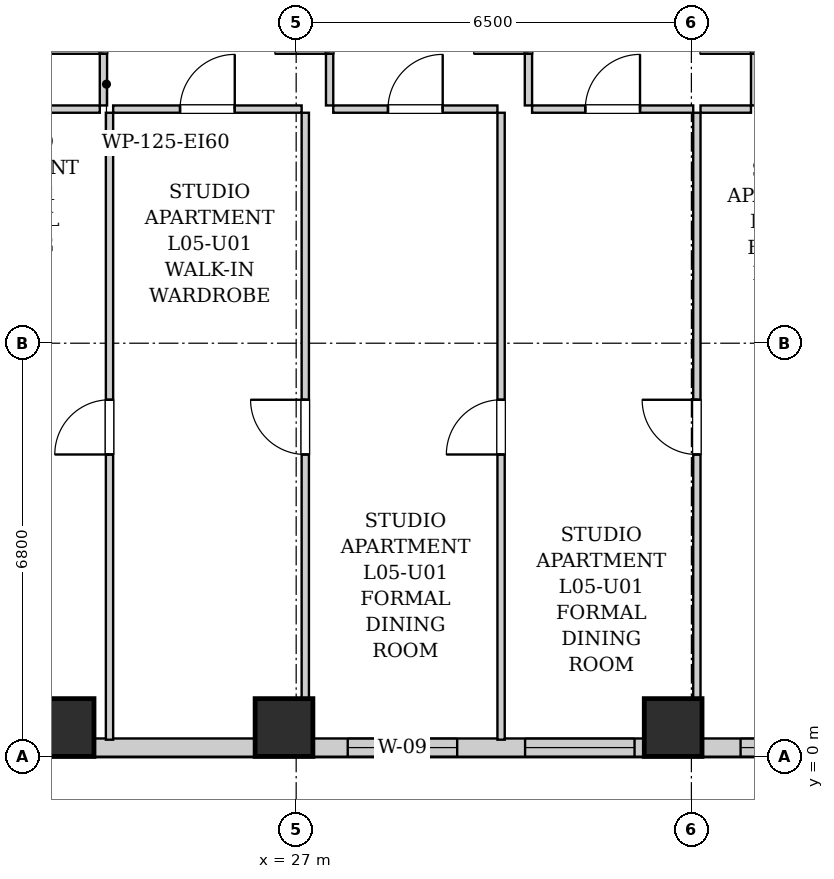
"""IFC4 building model, lengths in metres.
Left out: names, types, materials, properties, quantities, classifications, styles, units other than length and angle.
Written with IfcOpenShell. Run it as: python <this file> out.ifc"""

import sys

from ifc_helpers import new_model, si_unit, direction, frame, frame_2d, origin, origin_2d, place, context, subcontext, project, spatial, rectangle, extrude, element, fill, save


model = new_model("IFC4")
c1 = context("Model", 3, precision=1e-05, world=origin(), true_north=direction((0.0, 1.0)))
c2 = subcontext(c1, "Body", "Model", "MODEL_VIEW")
j1 = project(units=[si_unit("LENGTHUNIT", "METRE"), si_unit("PLANEANGLEUNIT", "RADIAN")], contexts=[c1])
p1 = place(None, origin())
s1 = spatial("IfcSite", under=j1, at=p1, CompositionType="ELEMENT")
p2 = place(p1, origin())
s2 = spatial("IfcBuilding", under=s1, at=p2, CompositionType="ELEMENT")
p3 = place(p2, frame((0.0, 0.0, 25.8)))
s3 = spatial("IfcBuildingStorey", under=s2, at=p3, CompositionType="ELEMENT", Elevation=25.8)
for number, where, z_axis, x_axis in (
    (1, (23.2, 0.48, 0.0), (0.0, 0.0, 1.0), (1.0, 0.0, 0.0)),
    (2, (26.8, 0.48, 0.0), (0.0, 0.0, 1.0), (1.0, 0.0, 0.0)),
    (3, (33.2, 0.48, 0.0), (0.0, 0.0, 1.0), (1.0, 0.0, 0.0)),
):
    element("IfcColumn", number, at=place(p3, frame(where, z_axis=z_axis, x_axis=x_axis)), inside=s3, PredefinedType="COLUMN", context=c2, shape_type="SweptSolid", body=[
        extrude(rectangle(XDim=0.95, YDim=0.95, at=origin_2d()), origin(), (0.0, 0.0, 1.0), 3.2),
    ])
p4 = place(p3, frame((44.0, 0.15, 0.0), z_axis=(0.0, 0.0, 1.0), x_axis=(-1.0, 0.0, 0.0)))
e4 = element("IfcWall", 4, at=p4, inside=s3, PredefinedType="SOLIDWALL", context=c2, shape_type="SweptSolid", body=[
    extrude(rectangle(XDim=28.1, YDim=0.3, at=frame_2d((14.05, 0.0))), origin(), (0.0, 0.0, 1.0), 1.975),
])
p5 = place(p4, frame((26.835, 0.0, 0.55)))
e5 = element("IfcOpeningElement", 5, at=p5, cuts=e4, PredefinedType="OPENING", context=c2, shape_type="SweptSolid", body=[
    extrude(rectangle(XDim=0.85, YDim=1.2, at=frame_2d((0.425, 0.6))), frame((0.0, 0.16, 0.0), z_axis=(0.0, -1.0, 0.0), x_axis=(1.0, 0.0, 0.0)), (0.0, 0.0, 1.0), 0.32),
])
p6 = place(p4, frame((23.765, 0.0, 0.55)))
e6 = element("IfcOpeningElement", 6, at=p6, cuts=e4, PredefinedType="OPENING", context=c2, shape_type="SweptSolid", body=[
    extrude(rectangle(XDim=1.8, YDim=1.2, at=frame_2d((0.9, 0.6))), frame((0.0, 0.16, 0.0), z_axis=(0.0, -1.0, 0.0), x_axis=(1.0, 0.0, 0.0)), (0.0, 0.0, 1.0), 0.32),
])
p7 = place(p4, frame((21.5, 0.0, 0.55)))
e7 = element("IfcOpeningElement", 7, at=p7, cuts=e4, PredefinedType="OPENING", context=c2, shape_type="SweptSolid", body=[
    extrude(rectangle(XDim=1.35, YDim=1.2, at=frame_2d((0.675, 0.6))), frame((0.0, 0.16, 0.0), z_axis=(0.0, -1.0, 0.0), x_axis=(1.0, 0.0, 0.0)), (0.0, 0.0, 1.0), 0.32),
])
p8 = place(p4, frame((14.352, 0.0, 0.55)))
e8 = element("IfcOpeningElement", 8, at=p8, cuts=e4, PredefinedType="OPENING", context=c2, shape_type="SweptSolid", body=[
    extrude(rectangle(XDim=1.8, YDim=1.2, at=frame_2d((0.9, 0.6))), frame((0.0, 0.16, 0.0), z_axis=(0.0, -1.0, 0.0), x_axis=(1.0, 0.0, 0.0)), (0.0, 0.0, 1.0), 0.32),
])
p9 = place(p4, frame((11.435, 0.0, 0.55)))
e9 = element("IfcOpeningElement", 9, at=p9, cuts=e4, PredefinedType="OPENING", context=c2, shape_type="SweptSolid", body=[
    extrude(rectangle(XDim=1.8, YDim=1.2, at=frame_2d((0.9, 0.6))), frame((0.0, 0.16, 0.0), z_axis=(0.0, -1.0, 0.0), x_axis=(1.0, 0.0, 0.0)), (0.0, 0.0, 1.0), 0.32),
])
p10 = place(p4, frame((7.891, 0.0, 0.55)))
e10 = element("IfcOpeningElement", 10, at=p10, cuts=e4, PredefinedType="OPENING", context=c2, shape_type="SweptSolid", body=[
    extrude(rectangle(XDim=1.8, YDim=1.2, at=frame_2d((0.9, 0.6))), frame((0.0, 0.16, 0.0), z_axis=(0.0, -1.0, 0.0), x_axis=(1.0, 0.0, 0.0)), (0.0, 0.0, 1.0), 0.32),
])
p11 = place(p4, frame((4.315, 0.0, 0.55)))
e11 = element("IfcOpeningElement", 11, at=p11, cuts=e4, PredefinedType="OPENING", context=c2, shape_type="SweptSolid", body=[
    extrude(rectangle(XDim=0.85, YDim=1.2, at=frame_2d((0.425, 0.6))), frame((0.0, 0.16, 0.0), z_axis=(0.0, -1.0, 0.0), x_axis=(1.0, 0.0, 0.0)), (0.0, 0.0, 1.0), 0.32),
])
p12 = place(p3, frame((23.83, 10.71, 0.0), z_axis=(0.0, 0.0, 1.0), x_axis=(0.0, 1.0, 0.0)))
e12 = element("IfcWall", 12, at=p12, inside=s3, PredefinedType="PARTITIONING", context=c2, shape_type="SweptSolid", body=[
    extrude(rectangle(XDim=2.6, YDim=0.12, at=frame_2d((1.3, 0.0))), origin(), (0.0, 0.0, 1.0), 2.94),
])
p13 = place(p12, frame((0.85, 0.0, 0.0)))
e13 = element("IfcOpeningElement", 13, at=p13, cuts=e12, PredefinedType="OPENING", context=c2, shape_type="SweptSolid", body=[
    extrude(rectangle(XDim=0.9, YDim=2.05, at=frame_2d((0.45, 1.025))), frame((0.0, 0.07, 0.0), z_axis=(0.0, -1.0, 0.0), x_axis=(1.0, 0.0, 0.0)), (0.0, 0.0, 1.0), 0.14),
])
p14 = place(p3, frame((20.77, 10.65, 0.0), z_axis=(0.0, 0.0, 1.0), x_axis=(1.0, 0.0, 0.0)))
e14 = element("IfcWall", 14, at=p14, inside=s3, PredefinedType="PARTITIONING", context=c2, shape_type="SweptSolid", body=[
    extrude(rectangle(XDim=3.0, YDim=0.12, at=frame_2d((1.5, 0.0))), origin(), (0.0, 0.0, 1.0), 2.94),
])
p15 = place(p14, frame((1.05, 0.0, 0.0)))
e15 = element("IfcOpeningElement", 15, at=p15, cuts=e14, PredefinedType="OPENING", context=c2, shape_type="SweptSolid", body=[
    extrude(rectangle(XDim=0.9, YDim=2.05, at=frame_2d((0.45, 1.025))), frame((0.0, 0.07, 0.0), z_axis=(0.0, -1.0, 0.0), x_axis=(1.0, 0.0, 0.0)), (0.0, 0.0, 1.0), 0.14),
])
p16 = place(p3, frame((27.55, 10.71, 0.0), z_axis=(0.0, 0.0, 1.0), x_axis=(0.0, 1.0, 0.0)))
e16 = element("IfcWall", 16, at=p16, inside=s3, PredefinedType="PARTITIONING", context=c2, shape_type="SweptSolid", body=[
    extrude(rectangle(XDim=2.6, YDim=0.12, at=frame_2d((1.3, 0.0))), origin(), (0.0, 0.0, 1.0), 2.94),
])
p17 = place(p16, frame((0.85, 0.0, 0.0)))
e17 = element("IfcOpeningElement", 17, at=p17, cuts=e16, PredefinedType="OPENING", context=c2, shape_type="SweptSolid", body=[
    extrude(rectangle(XDim=0.9, YDim=2.05, at=frame_2d((0.45, 1.025))), frame((0.0, 0.07, 0.0), z_axis=(0.0, -1.0, 0.0), x_axis=(1.0, 0.0, 0.0)), (0.0, 0.0, 1.0), 0.14),
])
p18 = place(p3, frame((23.99, 10.65, 0.0), z_axis=(0.0, 0.0, 1.0), x_axis=(1.0, 0.0, 0.0)))
e18 = element("IfcWall", 18, at=p18, inside=s3, PredefinedType="PARTITIONING", context=c2, shape_type="SweptSolid", body=[
    extrude(rectangle(XDim=3.1, YDim=0.12, at=frame_2d((1.55, 0.0))), origin(), (0.0, 0.0, 1.0), 2.94),
])
p19 = place(p18, frame((1.1, 0.0, 0.0)))
e19 = element("IfcOpeningElement", 19, at=p19, cuts=e18, PredefinedType="OPENING", context=c2, shape_type="SweptSolid", body=[
    extrude(rectangle(XDim=0.9, YDim=2.05, at=frame_2d((0.45, 1.025))), frame((0.0, 0.07, 0.0), z_axis=(0.0, -1.0, 0.0), x_axis=(1.0, 0.0, 0.0)), (0.0, 0.0, 1.0), 0.14),
])
p20 = place(p3, frame((30.82, 10.71, 0.0), z_axis=(0.0, 0.0, 1.0), x_axis=(0.0, 1.0, 0.0)))
e20 = element("IfcWall", 20, at=p20, inside=s3, PredefinedType="PARTITIONING", context=c2, shape_type="SweptSolid", body=[
    extrude(rectangle(XDim=2.6, YDim=0.12, at=frame_2d((1.3, 0.0))), origin(), (0.0, 0.0, 1.0), 2.94),
])
p21 = place(p20, frame((0.85, 0.0, 0.0)))
e21 = element("IfcOpeningElement", 21, at=p21, cuts=e20, PredefinedType="OPENING", context=c2, shape_type="SweptSolid", body=[
    extrude(rectangle(XDim=0.9, YDim=2.05, at=frame_2d((0.45, 1.025))), frame((0.0, 0.07, 0.0), z_axis=(0.0, -1.0, 0.0), x_axis=(1.0, 0.0, 0.0)), (0.0, 0.0, 1.0), 0.14),
])
p22 = place(p3, frame((27.61, 10.65, 0.0), z_axis=(0.0, 0.0, 1.0), x_axis=(1.0, 0.0, 0.0)))
e22 = element("IfcWall", 22, at=p22, inside=s3, PredefinedType="PARTITIONING", context=c2, shape_type="SweptSolid", body=[
    extrude(rectangle(XDim=2.7, YDim=0.12, at=frame_2d((1.35, 0.0))), origin(), (0.0, 0.0, 1.0), 2.94),
])
p23 = place(p22, frame((0.9, 0.0, 0.0)))
e23 = element("IfcOpeningElement", 23, at=p23, cuts=e22, PredefinedType="OPENING", context=c2, shape_type="SweptSolid", body=[
    extrude(rectangle(XDim=0.9, YDim=2.05, at=frame_2d((0.45, 1.025))), frame((0.0, 0.07, 0.0), z_axis=(0.0, -1.0, 0.0), x_axis=(1.0, 0.0, 0.0)), (0.0, 0.0, 1.0), 0.14),
])
p24 = place(p3, frame((34.54, 10.71, 0.0), z_axis=(0.0, 0.0, 1.0), x_axis=(0.0, 1.0, 0.0)))
e24 = element("IfcWall", 24, at=p24, inside=s3, PredefinedType="PARTITIONING", context=c2, shape_type="SweptSolid", body=[
    extrude(rectangle(XDim=2.6, YDim=0.12, at=frame_2d((1.3, 0.0))), origin(), (0.0, 0.0, 1.0), 2.94),
])
p25 = place(p24, frame((0.85, 0.0, 0.0)))
e25 = element("IfcOpeningElement", 25, at=p25, cuts=e24, PredefinedType="OPENING", context=c2, shape_type="SweptSolid", body=[
    extrude(rectangle(XDim=0.9, YDim=2.05, at=frame_2d((0.45, 1.025))), frame((0.0, 0.07, 0.0), z_axis=(0.0, -1.0, 0.0), x_axis=(1.0, 0.0, 0.0)), (0.0, 0.0, 1.0), 0.14),
])
p26 = place(p3, frame((30.88, 10.65, 0.0), z_axis=(0.0, 0.0, 1.0), x_axis=(1.0, 0.0, 0.0)))
e26 = element("IfcWall", 26, at=p26, inside=s3, PredefinedType="PARTITIONING", context=c2, shape_type="SweptSolid", body=[
    extrude(rectangle(XDim=2.65, YDim=0.12, at=frame_2d((1.325, 0.0))), origin(), (0.0, 0.0, 1.0), 2.94),
])
p27 = place(p26, frame((0.875, 0.0, 0.0)))
e27 = element("IfcOpeningElement", 27, at=p27, cuts=e26, PredefinedType="OPENING", context=c2, shape_type="SweptSolid", body=[
    extrude(rectangle(XDim=0.9, YDim=2.05, at=frame_2d((0.45, 1.025))), frame((0.0, 0.07, 0.0), z_axis=(0.0, -1.0, 0.0), x_axis=(1.0, 0.0, 0.0)), (0.0, 0.0, 1.0), 0.14),
])
p28 = place(p3, frame((33.65, 10.65, 0.0), z_axis=(0.0, 0.0, 1.0), x_axis=(1.0, 0.0, 0.0)))
e28 = element("IfcWall", 28, at=p28, inside=s3, PredefinedType="PARTITIONING", context=c2, shape_type="SweptSolid", body=[
    extrude(rectangle(XDim=0.83, YDim=0.12, at=frame_2d((0.415, 0.0))), origin(), (0.0, 0.0, 1.0), 2.94),
])
p29 = place(p3, frame((23.93, 0.28, 0.0), z_axis=(0.0, 0.0, 1.0), x_axis=(0.0, 1.0, 0.0)))
e29 = element("IfcWall", 29, at=p29, inside=s3, PredefinedType="PARTITIONING", context=c2, shape_type="SweptSolid", body=[
    extrude(rectangle(XDim=10.31, YDim=0.12, at=frame_2d((5.155, 0.0))), origin(), (0.0, 0.0, 1.0), 2.94),
])
p30 = place(p29, frame((4.69, 0.0, 0.0)))
e30 = element("IfcOpeningElement", 30, at=p30, cuts=e29, PredefinedType="OPENING", context=c2, shape_type="SweptSolid", body=[
    extrude(rectangle(XDim=0.9, YDim=2.05, at=frame_2d((0.45, 1.025))), frame((0.0, 0.07, 0.0), z_axis=(0.0, -1.0, 0.0), x_axis=(1.0, 0.0, 0.0)), (0.0, 0.0, 1.0), 0.14),
])
p31 = place(p3, frame((27.15, 0.28, 0.0), z_axis=(0.0, 0.0, 1.0), x_axis=(0.0, 1.0, 0.0)))
e31 = element("IfcWall", 31, at=p31, inside=s3, PredefinedType="PARTITIONING", context=c2, shape_type="SweptSolid", body=[
    extrude(rectangle(XDim=10.31, YDim=0.12, at=frame_2d((5.155, 0.0))), origin(), (0.0, 0.0, 1.0), 2.94),
])
p32 = place(p31, frame((4.69, 0.0, 0.0)))
e32 = element("IfcOpeningElement", 32, at=p32, cuts=e31, PredefinedType="OPENING", context=c2, shape_type="SweptSolid", body=[
    extrude(rectangle(XDim=0.9, YDim=2.05, at=frame_2d((0.45, 1.025))), frame((0.0, 0.07, 0.0), z_axis=(0.0, -1.0, 0.0), x_axis=(1.0, 0.0, 0.0)), (0.0, 0.0, 1.0), 0.14),
])
p33 = place(p3, frame((30.37, 0.28, 0.0), z_axis=(0.0, 0.0, 1.0), x_axis=(0.0, 1.0, 0.0)))
e33 = element("IfcWall", 33, at=p33, inside=s3, PredefinedType="PARTITIONING", context=c2, shape_type="SweptSolid", body=[
    extrude(rectangle(XDim=10.31, YDim=0.12, at=frame_2d((5.155, 0.0))), origin(), (0.0, 0.0, 1.0), 2.94),
])
p34 = place(p33, frame((4.69, 0.0, 0.0)))
e34 = element("IfcOpeningElement", 34, at=p34, cuts=e33, PredefinedType="OPENING", context=c2, shape_type="SweptSolid", body=[
    extrude(rectangle(XDim=0.9, YDim=2.05, at=frame_2d((0.45, 1.025))), frame((0.0, 0.07, 0.0), z_axis=(0.0, -1.0, 0.0), x_axis=(1.0, 0.0, 0.0)), (0.0, 0.0, 1.0), 0.14),
])
p35 = place(p3, frame((33.59, 0.28, 0.0), z_axis=(0.0, 0.0, 1.0), x_axis=(0.0, 1.0, 0.0)))
e35 = element("IfcWall", 35, at=p35, inside=s3, PredefinedType="PARTITIONING", context=c2, shape_type="SweptSolid", body=[
    extrude(rectangle(XDim=10.31, YDim=0.12, at=frame_2d((5.155, 0.0))), origin(), (0.0, 0.0, 1.0), 2.94),
])
p36 = place(p35, frame((4.69, 0.0, 0.0)))
e36 = element("IfcOpeningElement", 36, at=p36, cuts=e35, PredefinedType="OPENING", context=c2, shape_type="SweptSolid", body=[
    extrude(rectangle(XDim=0.9, YDim=2.05, at=frame_2d((0.45, 1.025))), frame((0.0, 0.07, 0.0), z_axis=(0.0, -1.0, 0.0), x_axis=(1.0, 0.0, 0.0)), (0.0, 0.0, 1.0), 0.14),
])
p37 = place(p13, origin())
e37 = element("IfcDoor", 37, at=p37, inside=s3, OperationType="SINGLE_SWING_LEFT", PredefinedType="DOOR", context=c2, shape_type="SweptSolid", body=[
    extrude(rectangle(XDim=0.9, YDim=2.05, at=frame_2d((0.45, 1.025))), frame((0.0, 0.025, 0.0), z_axis=(0.0, -1.0, 0.0), x_axis=(1.0, 0.0, 0.0)), (0.0, 0.0, 1.0), 0.05),
])
fill(e13, e37)
p38 = place(p17, origin())
e38 = element("IfcDoor", 38, at=p38, inside=s3, OperationType="SINGLE_SWING_LEFT", PredefinedType="DOOR", context=c2, shape_type="SweptSolid", body=[
    extrude(rectangle(XDim=0.9, YDim=2.05, at=frame_2d((0.45, 1.025))), frame((0.0, 0.025, 0.0), z_axis=(0.0, -1.0, 0.0), x_axis=(1.0, 0.0, 0.0)), (0.0, 0.0, 1.0), 0.05),
])
fill(e17, e38)
p39 = place(p19, origin())
e39 = element("IfcDoor", 39, at=p39, inside=s3, OperationType="SINGLE_SWING_RIGHT", PredefinedType="DOOR", context=c2, shape_type="SweptSolid", body=[
    extrude(rectangle(XDim=0.9, YDim=2.05, at=frame_2d((0.45, 1.025))), frame((0.0, 0.025, 0.0), z_axis=(0.0, -1.0, 0.0), x_axis=(1.0, 0.0, 0.0)), (0.0, 0.0, 1.0), 0.05),
])
fill(e19, e39)
p40 = place(p21, origin())
e40 = element("IfcDoor", 40, at=p40, inside=s3, OperationType="SINGLE_SWING_LEFT", PredefinedType="DOOR", context=c2, shape_type="SweptSolid", body=[
    extrude(rectangle(XDim=0.9, YDim=2.05, at=frame_2d((0.45, 1.025))), frame((0.0, 0.025, 0.0), z_axis=(0.0, -1.0, 0.0), x_axis=(1.0, 0.0, 0.0)), (0.0, 0.0, 1.0), 0.05),
])
fill(e21, e40)
p41 = place(p23, origin())
e41 = element("IfcDoor", 41, at=p41, inside=s3, OperationType="SINGLE_SWING_RIGHT", PredefinedType="DOOR", context=c2, shape_type="SweptSolid", body=[
    extrude(rectangle(XDim=0.9, YDim=2.05, at=frame_2d((0.45, 1.025))), frame((0.0, 0.025, 0.0), z_axis=(0.0, -1.0, 0.0), x_axis=(1.0, 0.0, 0.0)), (0.0, 0.0, 1.0), 0.05),
])
fill(e23, e41)
p42 = place(p25, origin())
e42 = element("IfcDoor", 42, at=p42, inside=s3, OperationType="SINGLE_SWING_LEFT", PredefinedType="DOOR", context=c2, shape_type="SweptSolid", body=[
    extrude(rectangle(XDim=0.9, YDim=2.05, at=frame_2d((0.45, 1.025))), frame((0.0, 0.025, 0.0), z_axis=(0.0, -1.0, 0.0), x_axis=(1.0, 0.0, 0.0)), (0.0, 0.0, 1.0), 0.05),
])
fill(e25, e42)
p43 = place(p27, origin())
e43 = element("IfcDoor", 43, at=p43, inside=s3, OperationType="SINGLE_SWING_RIGHT", PredefinedType="DOOR", context=c2, shape_type="SweptSolid", body=[
    extrude(rectangle(XDim=0.9, YDim=2.05, at=frame_2d((0.45, 1.025))), frame((0.0, 0.025, 0.0), z_axis=(0.0, -1.0, 0.0), x_axis=(1.0, 0.0, 0.0)), (0.0, 0.0, 1.0), 0.05),
])
fill(e27, e43)
p44 = place(p30, origin())
e44 = element("IfcDoor", 44, at=p44, inside=s3, OperationType="SINGLE_SWING_LEFT", PredefinedType="DOOR", context=c2, shape_type="SweptSolid", body=[
    extrude(rectangle(XDim=0.9, YDim=2.05, at=frame_2d((0.45, 1.025))), frame((0.0, 0.025, 0.0), z_axis=(0.0, -1.0, 0.0), x_axis=(1.0, 0.0, 0.0)), (0.0, 0.0, 1.0), 0.05),
])
fill(e30, e44)
p45 = place(p32, origin())
e45 = element("IfcDoor", 45, at=p45, inside=s3, OperationType="SINGLE_SWING_RIGHT", PredefinedType="DOOR", context=c2, shape_type="SweptSolid", body=[
    extrude(rectangle(XDim=0.9, YDim=2.05, at=frame_2d((0.45, 1.025))), frame((0.0, 0.025, 0.0), z_axis=(0.0, -1.0, 0.0), x_axis=(1.0, 0.0, 0.0)), (0.0, 0.0, 1.0), 0.05),
])
fill(e32, e45)
p46 = place(p34, origin())
e46 = element("IfcDoor", 46, at=p46, inside=s3, OperationType="SINGLE_SWING_LEFT", PredefinedType="DOOR", context=c2, shape_type="SweptSolid", body=[
    extrude(rectangle(XDim=0.9, YDim=2.05, at=frame_2d((0.45, 1.025))), frame((0.0, 0.025, 0.0), z_axis=(0.0, -1.0, 0.0), x_axis=(1.0, 0.0, 0.0)), (0.0, 0.0, 1.0), 0.05),
])
fill(e34, e46)
p47 = place(p36, origin())
e47 = element("IfcDoor", 47, at=p47, inside=s3, OperationType="SINGLE_SWING_RIGHT", PredefinedType="DOOR", context=c2, shape_type="SweptSolid", body=[
    extrude(rectangle(XDim=0.9, YDim=2.05, at=frame_2d((0.45, 1.025))), frame((0.0, 0.025, 0.0), z_axis=(0.0, -1.0, 0.0), x_axis=(1.0, 0.0, 0.0)), (0.0, 0.0, 1.0), 0.05),
])
fill(e36, e47)
p48 = place(p8, origin())
e48 = element("IfcWindow", 48, at=p48, inside=s3, PartitioningType="DOUBLE_PANEL_VERTICAL", PredefinedType="WINDOW", context=c2, shape_type="SweptSolid", body=[
    extrude(rectangle(XDim=1.8, YDim=1.2, at=frame_2d((0.9, 0.6))), frame((0.0, 0.03, 0.0), z_axis=(0.0, -1.0, 0.0), x_axis=(1.0, 0.0, 0.0)), (0.0, 0.0, 1.0), 0.06),
])
fill(e8, e48)
p49 = place(p9, origin())
e49 = element("IfcWindow", 49, at=p49, inside=s3, PartitioningType="DOUBLE_PANEL_VERTICAL", PredefinedType="WINDOW", context=c2, shape_type="SweptSolid", body=[
    extrude(rectangle(XDim=1.8, YDim=1.2, at=frame_2d((0.9, 0.6))), frame((0.0, 0.03, 0.0), z_axis=(0.0, -1.0, 0.0), x_axis=(1.0, 0.0, 0.0)), (0.0, 0.0, 1.0), 0.06),
])
fill(e9, e49)
p50 = place(p10, origin())
e50 = element("IfcWindow", 50, at=p50, inside=s3, PartitioningType="DOUBLE_PANEL_VERTICAL", PredefinedType="WINDOW", context=c2, shape_type="SweptSolid", body=[
    extrude(rectangle(XDim=1.8, YDim=1.2, at=frame_2d((0.9, 0.6))), frame((0.0, 0.03, 0.0), z_axis=(0.0, -1.0, 0.0), x_axis=(1.0, 0.0, 0.0)), (0.0, 0.0, 1.0), 0.06),
])
fill(e10, e50)
save(model, sys.argv[1])
